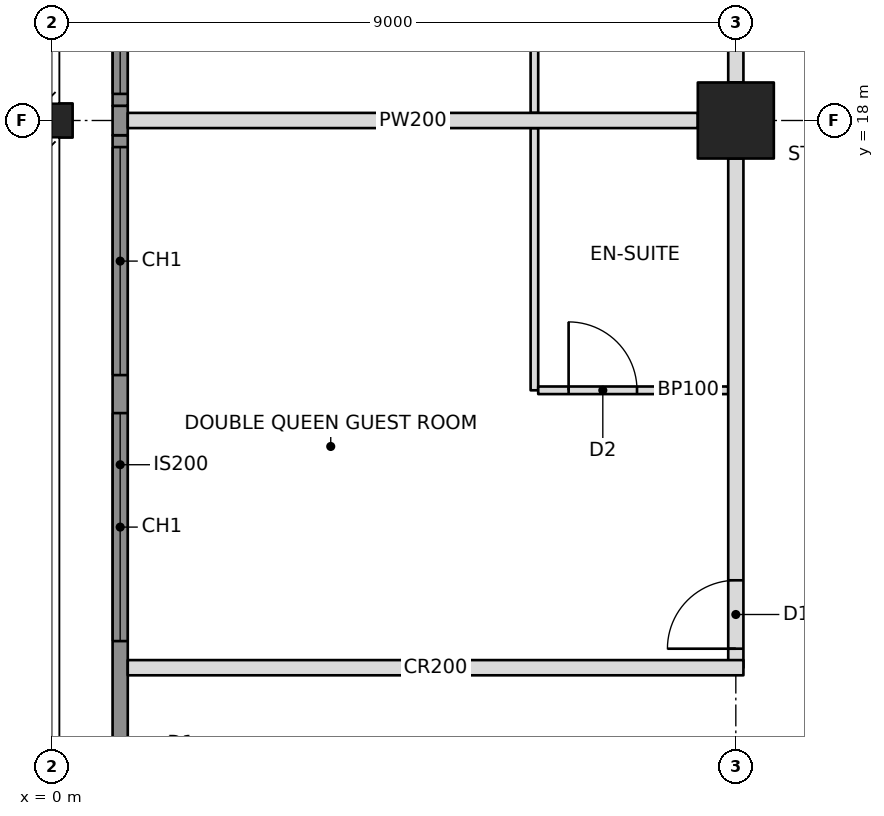
"""IFC4 building model, lengths in metres.
Left out: names, types, materials, properties, quantities, classifications, styles, units other than length and angle.
Written with IfcOpenShell. Run it as: python <this file> out.ifc"""

import sys

from ifc_helpers import new_model, si_unit, direction, frame, frame_2d, origin, origin_2d, place, context, subcontext, project, spatial, rectangle, hollow_rectangle, i_section, extrude, element, fill, save


model = new_model("IFC4")
c1 = context("Model", 3, precision=1e-05, world=origin(), true_north=direction((0.0, 1.0)))
c2 = subcontext(c1, "Body", "Model", "MODEL_VIEW")
j1 = project(units=[si_unit("LENGTHUNIT", "METRE"), si_unit("PLANEANGLEUNIT", "RADIAN")], contexts=[c1])
p1 = place(None, origin())
s1 = spatial("IfcSite", under=j1, at=p1, CompositionType="ELEMENT")
p2 = place(p1, origin())
s2 = spatial("IfcBuilding", under=s1, at=p2, CompositionType="ELEMENT")
p3 = place(p2, frame((0.0, 0.0, 94.2)))
s3 = spatial("IfcBuildingStorey", under=s2, at=p3, CompositionType="ELEMENT", Elevation=94.2)
p4 = place(p3, frame((0.0, 18.0, 0.0), z_axis=(0.0, 0.0, 1.0), x_axis=(0.0, 1.0, 0.0)))
e1 = element("IfcColumn", 1, at=p4, inside=s3, PredefinedType="COLUMN", context=c2, shape_type="SweptSolid", body=[
    extrude(i_section(OverallWidth=0.449, OverallDepth=0.549, WebThickness=0.072, FlangeThickness=0.115, at=origin_2d()), origin(), (0.0, 0.0, 1.0), 3.4),
])
p5 = place(p3, frame((9.0, 18.0, 0.0), z_axis=(0.0, 0.0, 1.0), x_axis=(1.0, 0.0, 0.0)))
e2 = element("IfcColumn", 2, at=p5, inside=s3, PredefinedType="COLUMN", context=c2, shape_type="SweptSolid", body=[
    extrude(hollow_rectangle(XDim=1.0, YDim=1.0, WallThickness=0.1, at=origin_2d()), origin(), (0.0, 0.0, 1.0), 3.4),
])
p6 = place(p3, frame((9.0, 10.8, 0.0), z_axis=(0.0, 0.0, 1.0), x_axis=(0.0, 1.0, 0.0)))
e3 = element("IfcWall", 3, at=p6, inside=s3, PredefinedType="PARTITIONING", context=c2, shape_type="SweptSolid", body=[
    extrude(rectangle(XDim=6.7, YDim=0.2, at=frame_2d((3.35, 0.0))), origin(), (0.0, 0.0, 1.0), 2.405),
])
p7 = place(p6, frame((0.25, 0.0, 0.0)))
e4 = element("IfcOpeningElement", 4, at=p7, cuts=e3, PredefinedType="OPENING", context=c2, shape_type="SweptSolid", body=[
    extrude(rectangle(XDim=0.9, YDim=2.1, at=frame_2d((0.45, 1.05))), frame((0.0, 0.11, 0.0), z_axis=(0.0, -1.0, 0.0), x_axis=(1.0, 0.0, 0.0)), (0.0, 0.0, 1.0), 0.22),
])
p8 = place(p3, frame((9.0, 18.5, 0.0), z_axis=(0.0, 0.0, 1.0), x_axis=(0.0, 1.0, 0.0)))
e5 = element("IfcWall", 5, at=p8, inside=s3, PredefinedType="PARTITIONING", context=c2, shape_type="SweptSolid", body=[
    extrude(rectangle(XDim=6.7, YDim=0.2, at=frame_2d((3.35, 0.0))), origin(), (0.0, 0.0, 1.0), 2.405),
])
p9 = place(p8, frame((5.55, 0.0, 0.0)))
e6 = element("IfcOpeningElement", 6, at=p9, cuts=e5, PredefinedType="OPENING", context=c2, shape_type="SweptSolid", body=[
    extrude(rectangle(XDim=0.9, YDim=2.1, at=frame_2d((0.45, 1.05))), frame((0.0, 0.11, 0.0), z_axis=(0.0, -1.0, 0.0), x_axis=(1.0, 0.0, 0.0)), (0.0, 0.0, 1.0), 0.22),
])
p10 = place(p3, frame((1.0, 10.8, 0.0), z_axis=(0.0, 0.0, 1.0), x_axis=(1.0, 0.0, 0.0)))
e7 = element("IfcWall", 7, at=p10, inside=s3, PredefinedType="PARTITIONING", context=c2, shape_type="SweptSolid", body=[
    extrude(rectangle(XDim=8.1, YDim=0.2, at=frame_2d((4.05, 0.0))), origin(), (0.0, 0.0, 1.0), 2.404),
])
p11 = place(p3, frame((8.5, 18.0, 0.0), z_axis=(0.0, 0.0, 1.0), x_axis=(-1.0, 0.0, 0.0)))
e8 = element("IfcWall", 8, at=p11, inside=s3, PredefinedType="PARTITIONING", context=c2, shape_type="SweptSolid", body=[
    extrude(rectangle(XDim=7.5, YDim=0.2, at=frame_2d((3.75, 0.0))), origin(), (0.0, 0.0, 1.0), 2.405),
])
p12 = place(p3, frame((6.35, 14.45, 0.0), z_axis=(0.0, 0.0, 1.0), x_axis=(0.0, 1.0, 0.0)))
e9 = element("IfcWall", 9, at=p12, inside=s3, PredefinedType="PARTITIONING", context=c2, shape_type="SweptSolid", body=[
    extrude(rectangle(XDim=3.45, YDim=0.1, at=frame_2d((1.725, 0.0))), origin(), (0.0, 0.0, 1.0), 2.404),
])
p13 = place(p3, frame((8.9, 14.45, 0.0), z_axis=(0.0, 0.0, 1.0), x_axis=(-1.0, 0.0, 0.0)))
e10 = element("IfcWall", 10, at=p13, inside=s3, PredefinedType="PARTITIONING", context=c2, shape_type="SweptSolid", body=[
    extrude(rectangle(XDim=2.5, YDim=0.1, at=frame_2d((1.25, 0.0))), origin(), (0.0, 0.0, 1.0), 2.404),
])
p14 = place(p13, frame((1.2, 0.0, 0.0)))
e11 = element("IfcOpeningElement", 11, at=p14, cuts=e10, PredefinedType="OPENING", context=c2, shape_type="SweptSolid", body=[
    extrude(rectangle(XDim=0.9, YDim=2.1, at=frame_2d((0.45, 1.05))), frame((0.0, 0.06, 0.0), z_axis=(0.0, -1.0, 0.0), x_axis=(1.0, 0.0, 0.0)), (0.0, 0.0, 1.0), 0.12),
])
p15 = place(p3, frame((6.35, 18.1, 0.0), z_axis=(0.0, 0.0, 1.0), x_axis=(0.0, 1.0, 0.0)))
e12 = element("IfcWall", 12, at=p15, inside=s3, PredefinedType="PARTITIONING", context=c2, shape_type="SweptSolid", body=[
    extrude(rectangle(XDim=3.45, YDim=0.1, at=frame_2d((1.725, 0.0))), origin(), (0.0, 0.0, 1.0), 2.404),
])
p16 = place(p3, frame((0.9, 9.135, 0.0), z_axis=(0.0, 0.0, 1.0), x_axis=(0.0, 1.0, 0.0)))
e13 = element("IfcWall", 13, at=p16, inside=s3, PredefinedType="SOLIDWALL", context=c2, shape_type="SweptSolid", body=[
    extrude(rectangle(XDim=8.671, YDim=0.2, at=frame_2d((4.335, 0.0))), origin(), (0.0, 0.0, 1.0), 3.2),
])
p17 = place(p16, frame((2.015, 0.0, 0.6)))
e14 = element("IfcOpeningElement", 14, at=p17, cuts=e13, PredefinedType="OPENING", context=c2, shape_type="SweptSolid", body=[
    extrude(rectangle(XDim=3.0, YDim=2.2, at=frame_2d((1.5, 1.1))), frame((0.0, 0.11, 0.0), z_axis=(0.0, -1.0, 0.0), x_axis=(1.0, 0.0, 0.0)), (0.0, 0.0, 1.0), 0.22),
])
p18 = place(p16, frame((5.515, 0.0, 0.6)))
e15 = element("IfcOpeningElement", 15, at=p18, cuts=e13, PredefinedType="OPENING", context=c2, shape_type="SweptSolid", body=[
    extrude(rectangle(XDim=3.0, YDim=2.2, at=frame_2d((1.5, 1.1))), frame((0.0, 0.11, 0.0), z_axis=(0.0, -1.0, 0.0), x_axis=(1.0, 0.0, 0.0)), (0.0, 0.0, 1.0), 0.22),
])
p19 = place(p3, frame((0.9, 17.806, 0.0), z_axis=(0.0, 0.0, 1.0), x_axis=(0.0, 1.0, 0.0)))
e16 = element("IfcWall", 16, at=p19, inside=s3, PredefinedType="SOLIDWALL", context=c2, shape_type="SweptSolid", body=[
    extrude(rectangle(XDim=0.388, YDim=0.2, at=frame_2d((0.194, 0.0))), origin(), (0.0, 0.0, 1.0), 2.404),
])
p20 = place(p3, frame((0.9, 18.194, 0.0), z_axis=(0.0, 0.0, 1.0), x_axis=(0.0, 1.0, 0.0)))
e17 = element("IfcWall", 17, at=p20, inside=s3, PredefinedType="SOLIDWALL", context=c2, shape_type="SweptSolid", body=[
    extrude(rectangle(XDim=8.671, YDim=0.2, at=frame_2d((4.335, 0.0))), origin(), (0.0, 0.0, 1.0), 3.2),
])
p21 = place(p20, frame((0.156, 0.0, 0.6)))
e18 = element("IfcOpeningElement", 18, at=p21, cuts=e17, PredefinedType="OPENING", context=c2, shape_type="SweptSolid", body=[
    extrude(rectangle(XDim=3.0, YDim=2.2, at=frame_2d((1.5, 1.1))), frame((0.0, 0.11, 0.0), z_axis=(0.0, -1.0, 0.0), x_axis=(1.0, 0.0, 0.0)), (0.0, 0.0, 1.0), 0.22),
])
p22 = place(p20, frame((3.656, 0.0, 0.6)))
e19 = element("IfcOpeningElement", 19, at=p22, cuts=e17, PredefinedType="OPENING", context=c2, shape_type="SweptSolid", body=[
    extrude(rectangle(XDim=3.0, YDim=2.2, at=frame_2d((1.5, 1.1))), frame((0.0, 0.11, 0.0), z_axis=(0.0, -1.0, 0.0), x_axis=(1.0, 0.0, 0.0)), (0.0, 0.0, 1.0), 0.22),
])
p23 = place(p17, origin())
e20 = element("IfcWindow", 20, at=p23, inside=s3, PartitioningType="TRIPLE_PANEL_VERTICAL", PredefinedType="WINDOW", context=c2, shape_type="SweptSolid", body=[
    extrude(rectangle(XDim=3.0, YDim=2.2, at=frame_2d((1.5, 1.1))), frame((0.0, 0.03, 0.0), z_axis=(0.0, -1.0, 0.0), x_axis=(1.0, 0.0, 0.0)), (0.0, 0.0, 1.0), 0.06),
])
fill(e14, e20)
p24 = place(p18, origin())
e21 = element("IfcWindow", 21, at=p24, inside=s3, PartitioningType="TRIPLE_PANEL_VERTICAL", PredefinedType="WINDOW", context=c2, shape_type="SweptSolid", body=[
    extrude(rectangle(XDim=3.0, YDim=2.2, at=frame_2d((1.5, 1.1))), frame((0.0, 0.03, 0.0), z_axis=(0.0, -1.0, 0.0), x_axis=(1.0, 0.0, 0.0)), (0.0, 0.0, 1.0), 0.06),
])
fill(e15, e21)
p25 = place(p21, origin())
e22 = element("IfcWindow", 22, at=p25, inside=s3, PartitioningType="TRIPLE_PANEL_VERTICAL", PredefinedType="WINDOW", context=c2, shape_type="SweptSolid", body=[
    extrude(rectangle(XDim=3.0, YDim=2.2, at=frame_2d((1.5, 1.1))), frame((0.0, 0.03, 0.0), z_axis=(0.0, -1.0, 0.0), x_axis=(1.0, 0.0, 0.0)), (0.0, 0.0, 1.0), 0.06),
])
fill(e18, e22)
p26 = place(p14, frame((0.9, 0.0, 0.0), z_axis=(0.0, 0.0, 1.0), x_axis=(-1.0, 0.0, 0.0)))
e23 = element("IfcDoor", 23, at=p26, inside=s3, OperationType="SINGLE_SWING_LEFT", PredefinedType="DOOR", context=c2, shape_type="SweptSolid", body=[
    extrude(rectangle(XDim=0.9, YDim=2.1, at=frame_2d((0.45, 1.05))), frame((0.0, 0.025, 0.0), z_axis=(0.0, -1.0, 0.0), x_axis=(1.0, 0.0, 0.0)), (0.0, 0.0, 1.0), 0.05),
])
fill(e11, e23)
p27 = place(p7, origin())
e24 = element("IfcDoor", 24, at=p27, inside=s3, OperationType="SINGLE_SWING_LEFT", PredefinedType="DOOR", context=c2, shape_type="SweptSolid", body=[
    extrude(rectangle(XDim=0.9, YDim=2.1, at=frame_2d((0.45, 1.05))), frame((0.0, 0.025, 0.0), z_axis=(0.0, -1.0, 0.0), x_axis=(1.0, 0.0, 0.0)), (0.0, 0.0, 1.0), 0.05),
])
fill(e4, e24)
save(model, sys.argv[1])
